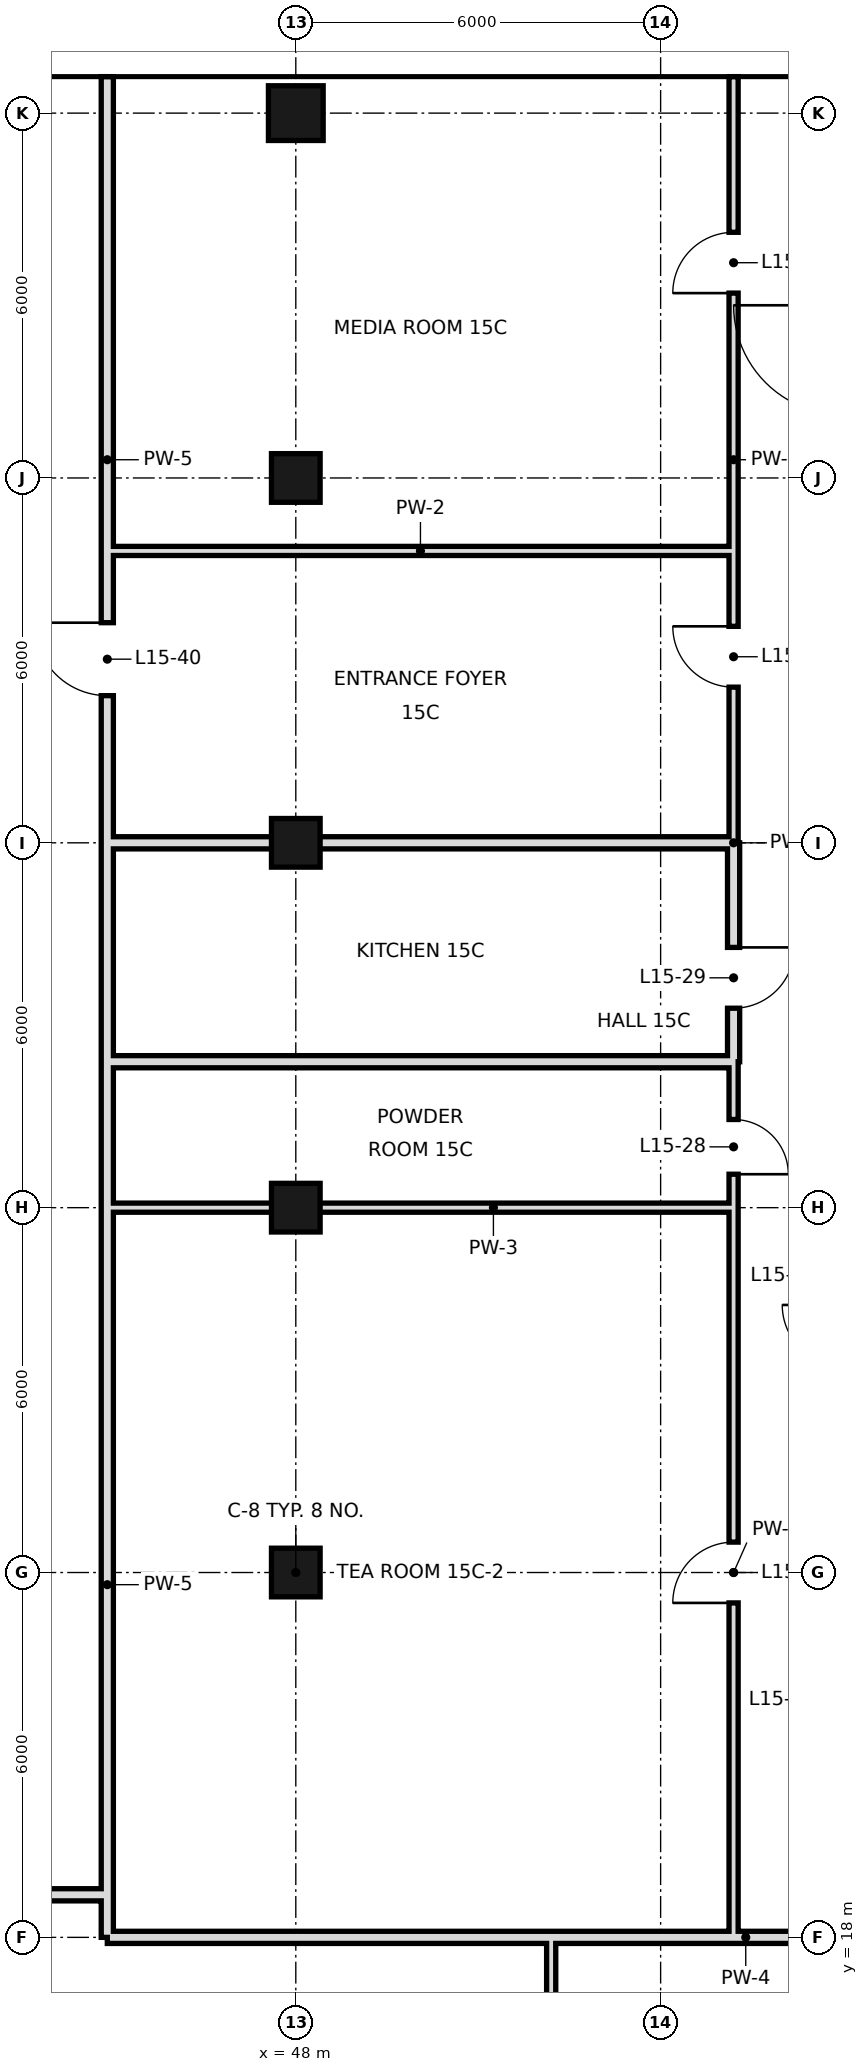
"""IFC4 building model, lengths in metres.
Left out: names, types, materials, properties, quantities, classifications, styles, units other than length and angle.
Written with IfcOpenShell. Run it as: python <this file> out.ifc"""

import sys

from ifc_helpers import new_model, si_unit, direction, frame, frame_2d, origin, origin_2d, place, context, subcontext, project, spatial, rectangle, hollow_rectangle, extrude, element, fill, save


model = new_model("IFC4")
c1 = context("Model", 3, precision=1e-05, world=origin(), true_north=direction((0.0, 1.0)))
c2 = subcontext(c1, "Body", "Model", "MODEL_VIEW")
j1 = project(units=[si_unit("LENGTHUNIT", "METRE"), si_unit("PLANEANGLEUNIT", "RADIAN")], contexts=[c1])
p1 = place(None, origin())
s1 = spatial("IfcSite", under=j1, at=p1, CompositionType="ELEMENT")
p2 = place(p1, origin())
s2 = spatial("IfcBuilding", under=s1, at=p2, CompositionType="ELEMENT")
p3 = place(p2, frame((0.0, 0.0, 75.0)))
s3 = spatial("IfcBuildingStorey", under=s2, at=p3, CompositionType="ELEMENT", Elevation=75.0)
for number, where, z_axis, x_axis in (
    (1, (48.0, 24.0, 0.0), (0.0, 0.0, 1.0), (1.0, 0.0, 0.0)),
    (2, (48.0, 30.0, 0.0), (0.0, 0.0, 1.0), (1.0, 0.0, 0.0)),
    (3, (48.0, 36.0, 0.0), (0.0, 0.0, 1.0), (1.0, 0.0, 0.0)),
    (4, (48.0, 42.0, 0.0), (0.0, 0.0, 1.0), (1.0, 0.0, 0.0)),
):
    element("IfcColumn", number, at=place(p3, frame(where, z_axis=z_axis, x_axis=x_axis)), inside=s3, PredefinedType="COLUMN", context=c2, shape_type="SweptSolid", body=[
        extrude(hollow_rectangle(XDim=0.8, YDim=0.8, WallThickness=0.04, at=origin_2d()), origin(), (0.0, 0.0, 1.0), 3.6),
    ])
p4 = place(p3, frame((48.0, 48.0, 0.0), z_axis=(0.0, 0.0, 1.0), x_axis=(1.0, 0.0, 0.0)))
e5 = element("IfcColumn", 5, at=p4, inside=s3, PredefinedType="COLUMN", context=c2, shape_type="SweptSolid", body=[
    extrude(hollow_rectangle(XDim=0.9, YDim=0.9, WallThickness=0.045, at=origin_2d()), origin(), (0.0, 0.0, 1.0), 3.6),
])
p5 = place(p3, frame((44.9, 18.7, 0.0), z_axis=(0.0, 0.0, 1.0), x_axis=(0.0, 1.0, 0.0)))
e6 = element("IfcWall", 6, at=p5, inside=s3, PredefinedType="SOLIDWALL", context=c2, shape_type="SweptSolid", body=[
    extrude(rectangle(XDim=13.7, YDim=0.2, at=frame_2d((6.85, 0.0))), origin(), (0.0, 0.0, 1.0), 2.97),
])
p6 = place(p3, frame((44.9, 36.0, 0.0), z_axis=(0.0, 0.0, 1.0), x_axis=(0.0, 1.0, 0.0)))
e7 = element("IfcWall", 7, at=p6, inside=s3, PredefinedType="SOLIDWALL", context=c2, shape_type="SweptSolid", body=[
    extrude(rectangle(XDim=12.6, YDim=0.2, at=frame_2d((6.3, 0.0))), origin(), (0.0, 0.0, 1.0), 2.72),
])
p7 = place(p6, frame((2.42, 0.0, 0.0)))
e8 = element("IfcOpeningElement", 8, at=p7, cuts=e7, PredefinedType="OPENING", context=c2, shape_type="SweptSolid", body=[
    extrude(rectangle(XDim=1.2, YDim=2.4, at=frame_2d((0.6, 1.2))), frame((0.0, 0.11, 0.0), z_axis=(0.0, -1.0, 0.0), x_axis=(1.0, 0.0, 0.0)), (0.0, 0.0, 1.0), 0.22),
])
p8 = place(p3, frame((44.9, 32.4, 0.0), z_axis=(0.0, 0.0, 1.0), x_axis=(0.0, 1.0, 0.0)))
e9 = element("IfcWall", 9, at=p8, inside=s3, PredefinedType="SOLIDWALL", context=c2, shape_type="SweptSolid", body=[
    extrude(rectangle(XDim=3.6, YDim=0.2, at=frame_2d((1.8, 0.0))), origin(), (0.0, 0.0, 1.0), 3.42),
])
p9 = place(p3, frame((44.9, 18.0, 0.0), z_axis=(0.0, 0.0, 1.0), x_axis=(0.0, 1.0, 0.0)))
e10 = element("IfcWall", 10, at=p9, inside=s3, PredefinedType="SOLIDWALL", context=c2, shape_type="SweptSolid", body=[
    extrude(rectangle(XDim=0.7, YDim=0.2, at=frame_2d((0.35, 0.0))), origin(), (0.0, 0.0, 1.0), 2.97),
])
p10 = place(p3, frame((52.2, 10.8, 0.0), z_axis=(0.0, 0.0, 1.0), x_axis=(0.0, 1.0, 0.0)))
e11 = element("IfcWall", 11, at=p10, inside=s3, PredefinedType="PARTITIONING", context=c2, shape_type="SweptSolid", body=[
    extrude(rectangle(XDim=7.2, YDim=0.15, at=frame_2d((3.6, 0.0))), origin(), (0.0, 0.0, 1.0), 3.42),
])
p11 = place(p3, frame((55.2, 32.4, 0.0), z_axis=(0.0, 0.0, 1.0), x_axis=(0.0, 1.0, 0.0)))
e12 = element("IfcWall", 12, at=p11, inside=s3, PredefinedType="SOLIDWALL", context=c2, shape_type="SweptSolid", body=[
    extrude(rectangle(XDim=3.6, YDim=0.2, at=frame_2d((1.8, 0.0))), origin(), (0.0, 0.0, 1.0), 2.52),
])
p12 = place(p11, frame((0.88, 0.0, 0.0)))
e13 = element("IfcOpeningElement", 13, at=p12, cuts=e12, PredefinedType="OPENING", context=c2, shape_type="SweptSolid", body=[
    extrude(rectangle(XDim=1.0, YDim=2.4, at=frame_2d((0.5, 1.2))), frame((0.0, 0.11, 0.0), z_axis=(0.0, -1.0, 0.0), x_axis=(1.0, 0.0, 0.0)), (0.0, 0.0, 1.0), 0.22),
])
p13 = place(p3, frame((55.2, 18.0, 0.0), z_axis=(0.0, 0.0, 1.0), x_axis=(0.0, 1.0, 0.0)))
e14 = element("IfcWall", 14, at=p13, inside=s3, PredefinedType="PARTITIONING", context=c2, shape_type="SweptSolid", body=[
    extrude(rectangle(XDim=12.0, YDim=0.15, at=frame_2d((6.0, 0.0))), origin(), (0.0, 0.0, 1.0), 3.42),
])
p14 = place(p13, frame((5.5, 0.0, 0.0)))
e15 = element("IfcOpeningElement", 15, at=p14, cuts=e14, PredefinedType="OPENING", context=c2, shape_type="SweptSolid", body=[
    extrude(rectangle(XDim=1.0, YDim=2.4, at=frame_2d((0.5, 1.2))), frame((0.0, 0.085, 0.0), z_axis=(0.0, -1.0, 0.0), x_axis=(1.0, 0.0, 0.0)), (0.0, 0.0, 1.0), 0.17),
])
p15 = place(p3, frame((55.2, 36.0, 0.0), z_axis=(0.0, 0.0, 1.0), x_axis=(0.0, 1.0, 0.0)))
e16 = element("IfcWall", 16, at=p15, inside=s3, PredefinedType="PARTITIONING", context=c2, shape_type="SweptSolid", body=[
    extrude(rectangle(XDim=12.6, YDim=0.15, at=frame_2d((6.3, 0.0))), origin(), (0.0, 0.0, 1.0), 3.42),
])
p16 = place(p15, frame((2.56, 0.0, 0.0)))
e17 = element("IfcOpeningElement", 17, at=p16, cuts=e16, PredefinedType="OPENING", context=c2, shape_type="SweptSolid", body=[
    extrude(rectangle(XDim=1.0, YDim=2.4, at=frame_2d((0.5, 1.2))), frame((0.0, 0.085, 0.0), z_axis=(0.0, -1.0, 0.0), x_axis=(1.0, 0.0, 0.0)), (0.0, 0.0, 1.0), 0.17),
])
p17 = place(p15, frame((9.04, 0.0, 0.0)))
e18 = element("IfcOpeningElement", 18, at=p17, cuts=e16, PredefinedType="OPENING", context=c2, shape_type="SweptSolid", body=[
    extrude(rectangle(XDim=1.0, YDim=2.4, at=frame_2d((0.5, 1.2))), frame((0.0, 0.085, 0.0), z_axis=(0.0, -1.0, 0.0), x_axis=(1.0, 0.0, 0.0)), (0.0, 0.0, 1.0), 0.17),
])
p18 = place(p3, frame((55.2, 30.0, 0.0), z_axis=(0.0, 0.0, 1.0), x_axis=(0.0, 1.0, 0.0)))
e19 = element("IfcWall", 19, at=p18, inside=s3, PredefinedType="PARTITIONING", context=c2, shape_type="SweptSolid", body=[
    extrude(rectangle(XDim=2.4, YDim=0.15, at=frame_2d((1.2, 0.0))), origin(), (0.0, 0.0, 1.0), 3.42),
])
p19 = place(p18, frame((0.55, 0.0, 0.0)))
e20 = element("IfcOpeningElement", 20, at=p19, cuts=e19, PredefinedType="OPENING", context=c2, shape_type="SweptSolid", body=[
    extrude(rectangle(XDim=0.9, YDim=2.4, at=frame_2d((0.45, 1.2))), frame((0.0, 0.085, 0.0), z_axis=(0.0, -1.0, 0.0), x_axis=(1.0, 0.0, 0.0)), (0.0, 0.0, 1.0), 0.17),
])
p20 = place(p3, frame((44.9, 18.0, 0.0), z_axis=(0.0, 0.0, 1.0), x_axis=(1.0, 0.0, 0.0)))
e21 = element("IfcWall", 21, at=p20, inside=s3, PredefinedType="SOLIDWALL", context=c2, shape_type="SweptSolid", body=[
    extrude(rectangle(XDim=21.7, YDim=0.2, at=frame_2d((10.85, 0.0))), origin(), (0.0, 0.0, 1.0), 2.52),
])
p21 = place(p3, frame((41.4, 18.7, 0.0), z_axis=(0.0, 0.0, 1.0), x_axis=(1.0, 0.0, 0.0)))
e22 = element("IfcWall", 22, at=p21, inside=s3, PredefinedType="SOLIDWALL", context=c2, shape_type="SweptSolid", body=[
    extrude(rectangle(XDim=3.5, YDim=0.2, at=frame_2d((1.75, 0.0))), origin(), (0.0, 0.0, 1.0), 2.72),
])
p22 = place(p3, frame((44.9, 30.0, 0.0), z_axis=(0.0, 0.0, 1.0), x_axis=(1.0, 0.0, 0.0)))
e23 = element("IfcWall", 23, at=p22, inside=s3, PredefinedType="PARTITIONING", context=c2, shape_type="SweptSolid", body=[
    extrude(rectangle(XDim=10.3, YDim=0.15, at=frame_2d((5.15, 0.0))), origin(), (0.0, 0.0, 1.0), 2.52),
])
p23 = place(p3, frame((44.9, 32.4, 0.0), z_axis=(0.0, 0.0, 1.0), x_axis=(1.0, 0.0, 0.0)))
e24 = element("IfcWall", 24, at=p23, inside=s3, PredefinedType="SOLIDWALL", context=c2, shape_type="SweptSolid", body=[
    extrude(rectangle(XDim=10.3, YDim=0.2, at=frame_2d((5.15, 0.0))), origin(), (0.0, 0.0, 1.0), 2.97),
])
p24 = place(p3, frame((44.9, 36.0, 0.0), z_axis=(0.0, 0.0, 1.0), x_axis=(1.0, 0.0, 0.0)))
e25 = element("IfcWall", 25, at=p24, inside=s3, PredefinedType="SOLIDWALL", context=c2, shape_type="SweptSolid", body=[
    extrude(rectangle(XDim=10.3, YDim=0.2, at=frame_2d((5.15, 0.0))), origin(), (0.0, 0.0, 1.0), 2.52),
])
p25 = place(p3, frame((44.9, 40.8, 0.0), z_axis=(0.0, 0.0, 1.0), x_axis=(1.0, 0.0, 0.0)))
e26 = element("IfcWall", 26, at=p25, inside=s3, PredefinedType="PARTITIONING", context=c2, shape_type="SweptSolid", body=[
    extrude(rectangle(XDim=10.3, YDim=0.15, at=frame_2d((5.15, 0.0))), origin(), (0.0, 0.0, 1.0), 3.42),
])
p26 = place(p16, frame((1.0, 0.0, 0.0), z_axis=(0.0, 0.0, 1.0), x_axis=(-1.0, 0.0, 0.0)))
e27 = element("IfcDoor", 27, at=p26, inside=s3, OperationType="SINGLE_SWING_LEFT", PredefinedType="DOOR", context=c2, shape_type="SweptSolid", body=[
    extrude(rectangle(XDim=1.0, YDim=2.4, at=frame_2d((0.5, 1.2))), frame((0.0, 0.025, 0.0), z_axis=(0.0, -1.0, 0.0), x_axis=(1.0, 0.0, 0.0)), (0.0, 0.0, 1.0), 0.05),
])
fill(e17, e27)
p27 = place(p14, origin())
e28 = element("IfcDoor", 28, at=p27, inside=s3, OperationType="SINGLE_SWING_LEFT", PredefinedType="DOOR", context=c2, shape_type="SweptSolid", body=[
    extrude(rectangle(XDim=1.0, YDim=2.4, at=frame_2d((0.5, 1.2))), frame((0.0, 0.025, 0.0), z_axis=(0.0, -1.0, 0.0), x_axis=(1.0, 0.0, 0.0)), (0.0, 0.0, 1.0), 0.05),
])
fill(e15, e28)
p28 = place(p19, frame((0.9, 0.0, 0.0), z_axis=(0.0, 0.0, 1.0), x_axis=(-1.0, 0.0, 0.0)))
e29 = element("IfcDoor", 29, at=p28, inside=s3, OperationType="SINGLE_SWING_RIGHT", PredefinedType="DOOR", context=c2, shape_type="SweptSolid", body=[
    extrude(rectangle(XDim=0.9, YDim=2.4, at=frame_2d((0.45, 1.2))), frame((0.0, 0.025, 0.0), z_axis=(0.0, -1.0, 0.0), x_axis=(1.0, 0.0, 0.0)), (0.0, 0.0, 1.0), 0.05),
])
fill(e20, e29)
p29 = place(p12, origin())
e30 = element("IfcDoor", 30, at=p29, inside=s3, OperationType="SINGLE_SWING_RIGHT", PredefinedType="DOOR", context=c2, shape_type="SweptSolid", body=[
    extrude(rectangle(XDim=1.0, YDim=2.4, at=frame_2d((0.5, 1.2))), frame((0.0, 0.025, 0.0), z_axis=(0.0, -1.0, 0.0), x_axis=(1.0, 0.0, 0.0)), (0.0, 0.0, 1.0), 0.05),
])
fill(e13, e30)
p30 = place(p17, origin())
e31 = element("IfcDoor", 31, at=p30, inside=s3, OperationType="SINGLE_SWING_LEFT", PredefinedType="DOOR", context=c2, shape_type="SweptSolid", body=[
    extrude(rectangle(XDim=1.0, YDim=2.4, at=frame_2d((0.5, 1.2))), frame((0.0, 0.025, 0.0), z_axis=(0.0, -1.0, 0.0), x_axis=(1.0, 0.0, 0.0)), (0.0, 0.0, 1.0), 0.05),
])
fill(e18, e31)
p31 = place(p7, frame((1.2, 0.0, 0.0), z_axis=(0.0, 0.0, 1.0), x_axis=(-1.0, 0.0, 0.0)))
e32 = element("IfcDoor", 32, at=p31, inside=s3, OperationType="SINGLE_SWING_LEFT", PredefinedType="DOOR", context=c2, shape_type="SweptSolid", body=[
    extrude(rectangle(XDim=1.2, YDim=2.4, at=frame_2d((0.6, 1.2))), frame((0.0, 0.025, 0.0), z_axis=(0.0, -1.0, 0.0), x_axis=(1.0, 0.0, 0.0)), (0.0, 0.0, 1.0), 0.05),
])
fill(e8, e32)
save(model, sys.argv[1])
